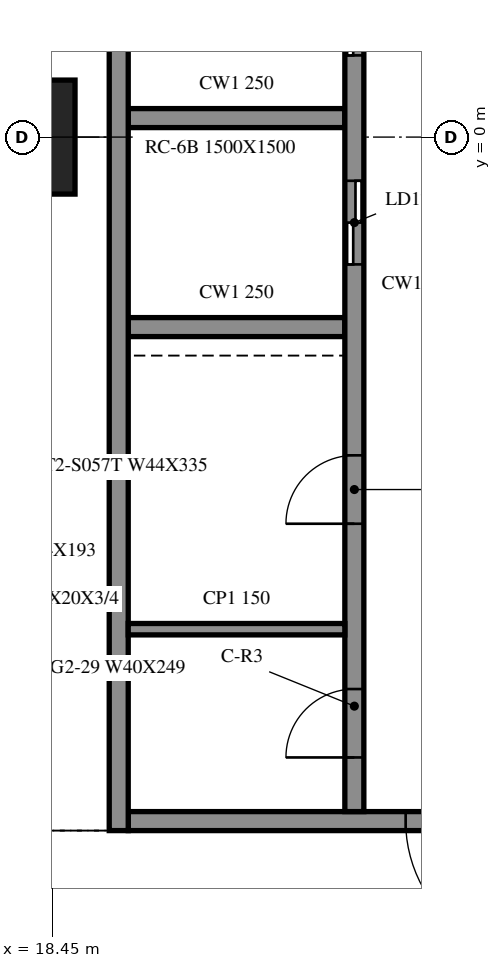
"""IFC4 building model, lengths in metres.
Left out: names, types, materials, properties, quantities, classifications, styles, units other than length and angle.
Written with IfcOpenShell. Run it as: python <this file> out.ifc"""

import sys

from ifc_helpers import new_model, si_unit, direction, frame, frame_2d, origin, origin_2d, place, context, subcontext, project, spatial, rectangle, extrude, element, fill, save


model = new_model("IFC4")
c1 = context("Model", 3, precision=1e-05, world=origin(), true_north=direction((0.0, 1.0)))
c2 = subcontext(c1, "Body", "Model", "MODEL_VIEW")
j1 = project(units=[si_unit("LENGTHUNIT", "METRE"), si_unit("PLANEANGLEUNIT", "RADIAN")], contexts=[c1])
p1 = place(None, origin())
s1 = spatial("IfcSite", under=j1, at=p1, CompositionType="ELEMENT")
p2 = place(p1, origin())
s2 = spatial("IfcBuilding", under=s1, at=p2, CompositionType="ELEMENT")
p3 = place(p2, frame((0.0, 0.0, 80.4)))
s3 = spatial("IfcBuildingStorey", under=s2, at=p3, CompositionType="ELEMENT", Elevation=80.4)
p4 = place(p3, frame((18.0, 0.0, -0.55), z_axis=(0.0, 0.0, 1.0), x_axis=(1.0, 0.0, 0.0)))
e1 = element("IfcColumn", 1, at=p4, inside=s3, PredefinedType="COLUMN", context=c2, shape_type="SweptSolid", body=[
    extrude(rectangle(XDim=1.5, YDim=1.5, at=origin_2d()), origin(), (0.0, 0.0, 1.0), 4.61),
])
p5 = place(p3, frame((19.325, 15.125, 0.0), z_axis=(0.0, 0.0, 1.0), x_axis=(0.0, -1.0, 0.0)))
e2 = element("IfcWall", 2, at=p5, inside=s3, PredefinedType="SOLIDWALL", context=c2, shape_type="SweptSolid", body=[
    extrude(rectangle(XDim=24.25, YDim=0.25, at=frame_2d((12.125, 0.0))), origin(), (0.0, 0.0, 1.0), 4.06),
])
p6 = place(p3, frame((28.55, -9.0, 0.0), z_axis=(0.0, 0.0, 1.0), x_axis=(-1.0, 0.0, 0.0)))
e3 = element("IfcWall", 3, at=p6, inside=s3, PredefinedType="SOLIDWALL", context=c2, shape_type="SweptSolid", body=[
    extrude(rectangle(XDim=9.1, YDim=0.25, at=frame_2d((4.55, 0.0))), origin(), (0.0, 0.0, 1.0), 4.06),
])
p7 = place(p6, frame((3.65, 0.0, 0.0)))
e4 = element("IfcOpeningElement", 4, at=p7, cuts=e3, PredefinedType="OPENING", context=c2, shape_type="SweptSolid", body=[
    extrude(rectangle(XDim=1.8, YDim=2.1, at=frame_2d((0.9, 1.05))), frame((0.0, 0.135, 0.0), z_axis=(0.0, -1.0, 0.0), x_axis=(1.0, 0.0, 0.0)), (0.0, 0.0, 1.0), 0.27),
])
p8 = place(p3, frame((22.425, -8.875, 0.0), z_axis=(0.0, 0.0, 1.0), x_axis=(0.0, 1.0, 0.0)))
e5 = element("IfcWall", 5, at=p8, inside=s3, PredefinedType="SOLIDWALL", context=c2, shape_type="SweptSolid", body=[
    extrude(rectangle(XDim=17.5, YDim=0.25, at=frame_2d((8.75, 0.0))), origin(), (0.0, 0.0, 1.0), 4.06),
])
p9 = place(p8, frame((7.2, 0.0, 0.0)))
e6 = element("IfcOpeningElement", 6, at=p9, cuts=e5, PredefinedType="OPENING", context=c2, shape_type="SweptSolid", body=[
    extrude(rectangle(XDim=1.1, YDim=2.1, at=frame_2d((0.55, 1.05))), frame((0.0, 0.135, 0.0), z_axis=(0.0, -1.0, 0.0), x_axis=(1.0, 0.0, 0.0)), (0.0, 0.0, 1.0), 0.27),
])
p10 = place(p8, frame((9.95, 0.0, 0.0)))
e7 = element("IfcOpeningElement", 7, at=p10, cuts=e5, PredefinedType="OPENING", context=c2, shape_type="SweptSolid", body=[
    extrude(rectangle(XDim=1.1, YDim=2.1, at=frame_2d((0.55, 1.05))), frame((0.0, 0.135, 0.0), z_axis=(0.0, -1.0, 0.0), x_axis=(1.0, 0.0, 0.0)), (0.0, 0.0, 1.0), 0.27),
])
p11 = place(p8, frame((12.7, 0.0, 0.0)))
e8 = element("IfcOpeningElement", 8, at=p11, cuts=e5, PredefinedType="OPENING", context=c2, shape_type="SweptSolid", body=[
    extrude(rectangle(XDim=1.1, YDim=2.1, at=frame_2d((0.55, 1.05))), frame((0.0, 0.135, 0.0), z_axis=(0.0, -1.0, 0.0), x_axis=(1.0, 0.0, 0.0)), (0.0, 0.0, 1.0), 0.27),
])
p12 = place(p8, frame((15.45, 0.0, 0.0)))
e9 = element("IfcOpeningElement", 9, at=p12, cuts=e5, PredefinedType="OPENING", context=c2, shape_type="SweptSolid", body=[
    extrude(rectangle(XDim=1.1, YDim=2.1, at=frame_2d((0.55, 1.05))), frame((0.0, 0.135, 0.0), z_axis=(0.0, -1.0, 0.0), x_axis=(1.0, 0.0, 0.0)), (0.0, 0.0, 1.0), 0.27),
])
p13 = place(p8, frame((0.712, 0.0, 0.0)))
e10 = element("IfcOpeningElement", 10, at=p13, cuts=e5, PredefinedType="OPENING", context=c2, shape_type="SweptSolid", body=[
    extrude(rectangle(XDim=0.9, YDim=2.1, at=frame_2d((0.45, 1.05))), frame((0.0, 0.135, 0.0), z_axis=(0.0, -1.0, 0.0), x_axis=(1.0, 0.0, 0.0)), (0.0, 0.0, 1.0), 0.27),
])
p14 = place(p8, frame((3.788, 0.0, 0.0)))
e11 = element("IfcOpeningElement", 11, at=p14, cuts=e5, PredefinedType="OPENING", context=c2, shape_type="SweptSolid", body=[
    extrude(rectangle(XDim=0.9, YDim=2.1, at=frame_2d((0.45, 1.05))), frame((0.0, 0.135, 0.0), z_axis=(0.0, -1.0, 0.0), x_axis=(1.0, 0.0, 0.0)), (0.0, 0.0, 1.0), 0.27),
])
for number, where, z_axis, x_axis in (
    (12, (19.45, -2.5, 0.0), (0.0, 0.0, 1.0), (1.0, 0.0, 0.0)),
    (13, (19.45, 0.25, 0.0), (0.0, 0.0, 1.0), (1.0, 0.0, 0.0)),
):
    element("IfcWall", number, at=place(p3, frame(where, z_axis=z_axis, x_axis=x_axis)), inside=s3, PredefinedType="SOLIDWALL", context=c2, shape_type="SweptSolid", body=[
        extrude(rectangle(XDim=2.85, YDim=0.25, at=frame_2d((1.425, 0.0))), origin(), (0.0, 0.0, 1.0), 4.06),
    ])
p15 = place(p3, frame((19.45, -6.475, 0.0), z_axis=(0.0, 0.0, 1.0), x_axis=(1.0, 0.0, 0.0)))
e14 = element("IfcWall", 14, at=p15, inside=s3, PredefinedType="PARTITIONING", context=c2, shape_type="SweptSolid", body=[
    extrude(rectangle(XDim=2.85, YDim=0.15, at=frame_2d((1.425, 0.0))), origin(), (0.0, 0.0, 1.0), 4.06),
])
p16 = place(p7, origin())
e15 = element("IfcDoor", 15, at=p16, inside=s3, OperationType="DOUBLE_DOOR_SINGLE_SWING", PredefinedType="DOOR", context=c2, shape_type="SweptSolid", body=[
    extrude(rectangle(XDim=1.8, YDim=2.1, at=frame_2d((0.9, 1.05))), frame((0.0, 0.025, 0.0), z_axis=(0.0, -1.0, 0.0), x_axis=(1.0, 0.0, 0.0)), (0.0, 0.0, 1.0), 0.05),
])
fill(e4, e15)
p17 = place(p9, origin())
e16 = element("IfcDoor", 16, at=p17, inside=s3, OperationType="DOUBLE_DOOR_SLIDING", PredefinedType="DOOR", context=c2, shape_type="SweptSolid", body=[
    extrude(rectangle(XDim=1.1, YDim=2.1, at=frame_2d((0.55, 1.05))), frame((0.0, 0.025, 0.0), z_axis=(0.0, -1.0, 0.0), x_axis=(1.0, 0.0, 0.0)), (0.0, 0.0, 1.0), 0.05),
])
fill(e6, e16)
p18 = place(p10, origin())
e17 = element("IfcDoor", 17, at=p18, inside=s3, OperationType="DOUBLE_DOOR_SLIDING", PredefinedType="DOOR", context=c2, shape_type="SweptSolid", body=[
    extrude(rectangle(XDim=1.1, YDim=2.1, at=frame_2d((0.55, 1.05))), frame((0.0, 0.025, 0.0), z_axis=(0.0, -1.0, 0.0), x_axis=(1.0, 0.0, 0.0)), (0.0, 0.0, 1.0), 0.05),
])
fill(e7, e17)
p19 = place(p13, origin())
e18 = element("IfcDoor", 18, at=p19, inside=s3, OperationType="SINGLE_SWING_LEFT", PredefinedType="DOOR", context=c2, shape_type="SweptSolid", body=[
    extrude(rectangle(XDim=0.9, YDim=2.1, at=frame_2d((0.45, 1.05))), frame((0.0, 0.025, 0.0), z_axis=(0.0, -1.0, 0.0), x_axis=(1.0, 0.0, 0.0)), (0.0, 0.0, 1.0), 0.05),
])
fill(e10, e18)
p20 = place(p14, origin())
e19 = element("IfcDoor", 19, at=p20, inside=s3, OperationType="SINGLE_SWING_RIGHT", PredefinedType="DOOR", context=c2, shape_type="SweptSolid", body=[
    extrude(rectangle(XDim=0.9, YDim=2.1, at=frame_2d((0.45, 1.05))), frame((0.0, 0.025, 0.0), z_axis=(0.0, -1.0, 0.0), x_axis=(1.0, 0.0, 0.0)), (0.0, 0.0, 1.0), 0.05),
])
fill(e11, e19)
save(model, sys.argv[1])
